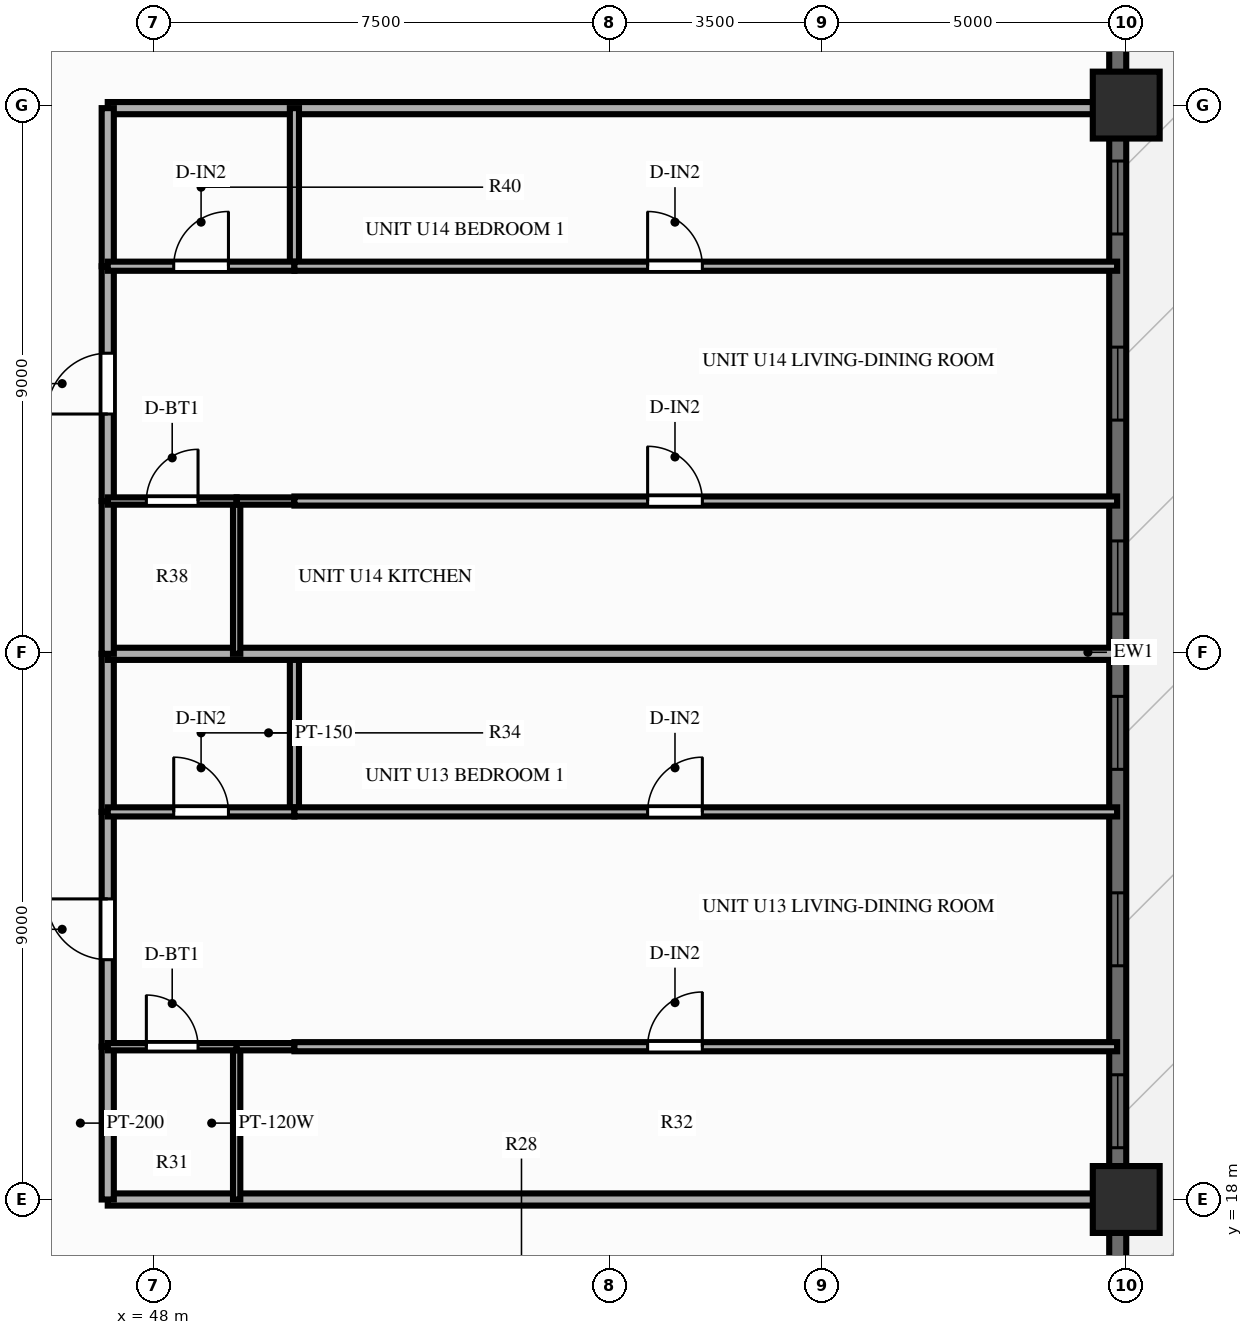
"""IFC4 building model, lengths in metres.
Left out: names, types, materials, properties, quantities, classifications, styles, units other than length and angle.
Written with IfcOpenShell. Run it as: python <this file> out.ifc"""

import sys

from ifc_helpers import new_model, si_unit, direction, frame, frame_2d, origin, origin_2d, place, context, subcontext, project, spatial, rectangle, extrude, source, transform, mapped, element, fill, save


model = new_model("IFC4")
c1 = context("Model", 3, precision=1e-05, world=origin(), true_north=direction((0.0, 1.0)))
c2 = subcontext(c1, "Body", "Model", "MODEL_VIEW")
j1 = project(units=[si_unit("LENGTHUNIT", "METRE"), si_unit("PLANEANGLEUNIT", "RADIAN")], contexts=[c1])
p1 = place(None, origin())
s1 = spatial("IfcSite", under=j1, at=p1, CompositionType="ELEMENT")
p2 = place(p1, origin())
s2 = spatial("IfcBuilding", under=s1, at=p2, CompositionType="ELEMENT")
p3 = place(p2, frame((0.0, 0.0, 25.4)))
s3 = spatial("IfcBuildingStorey", under=s2, at=p3, CompositionType="ELEMENT", Elevation=25.4)
m1 = source(origin(), c2, "Body", "SweptSolid", [
    extrude(rectangle(XDim=1.1, YDim=1.1, at=origin_2d()), origin(), (0.0, 0.0, 1.0), 3.0),
])
for number, where, z_axis, x_axis in (
    (1, (64.0, 18.0, 0.0), (0.0, 0.0, 1.0), (1.0, 0.0, 0.0)),
    (2, (64.0, 36.0, 0.0), (0.0, 0.0, 1.0), (1.0, 0.0, 0.0)),
):
    element("IfcColumn", number, at=place(p3, frame(where, z_axis=z_axis, x_axis=x_axis)), inside=s3, PredefinedType="COLUMN", context=c2, shape_type="MappedRepresentation", body=[
        mapped(m1, transform((0.0, 0.0, 0.0), scale=1.0)),
    ])
p4 = place(p3, frame((63.86, 6.5, 0.0), z_axis=(0.0, 0.0, 1.0), x_axis=(0.0, 1.0, 0.0)))
e3 = element("IfcWall", 3, at=p4, inside=s3, PredefinedType="SOLIDWALL", context=c2, shape_type="SweptSolid", body=[
    extrude(rectangle(XDim=41.0, YDim=0.28, at=frame_2d((20.5, 0.0))), origin(), (0.0, 0.0, 1.0), 2.28),
])
p5 = place(p4, frame((5.15, 0.0, 0.25)))
e4 = element("IfcOpeningElement", 4, at=p5, cuts=e3, PredefinedType="OPENING", context=c2, shape_type="SweptSolid", body=[
    extrude(rectangle(XDim=1.2, YDim=1.5, at=frame_2d((0.6, 0.75))), frame((0.0, 0.152, 0.0), z_axis=(0.0, -1.0, 0.0), x_axis=(1.0, 0.0, 0.0)), (0.0, 0.0, 1.0), 0.304),
])
p6 = place(p4, frame((12.352, 0.0, 0.25)))
e5 = element("IfcOpeningElement", 5, at=p6, cuts=e3, PredefinedType="OPENING", context=c2, shape_type="SweptSolid", body=[
    extrude(rectangle(XDim=1.2, YDim=1.5, at=frame_2d((0.6, 0.75))), frame((0.0, 0.152, 0.0), z_axis=(0.0, -1.0, 0.0), x_axis=(1.0, 0.0, 0.0)), (0.0, 0.0, 1.0), 0.304),
])
p7 = place(p4, frame((15.344, 0.0, 0.25)))
e6 = element("IfcOpeningElement", 6, at=p7, cuts=e3, PredefinedType="OPENING", context=c2, shape_type="SweptSolid", body=[
    extrude(rectangle(XDim=1.2, YDim=1.5, at=frame_2d((0.6, 0.75))), frame((0.0, 0.152, 0.0), z_axis=(0.0, -1.0, 0.0), x_axis=(1.0, 0.0, 0.0)), (0.0, 0.0, 1.0), 0.304),
])
p8 = place(p4, frame((18.575, 0.0, 0.25)))
e7 = element("IfcOpeningElement", 7, at=p8, cuts=e3, PredefinedType="OPENING", context=c2, shape_type="SweptSolid", body=[
    extrude(rectangle(XDim=1.2, YDim=1.5, at=frame_2d((0.6, 0.75))), frame((0.0, 0.152, 0.0), z_axis=(0.0, -1.0, 0.0), x_axis=(1.0, 0.0, 0.0)), (0.0, 0.0, 1.0), 0.304),
])
p9 = place(p4, frame((21.132, 0.0, 0.25)))
e8 = element("IfcOpeningElement", 8, at=p9, cuts=e3, PredefinedType="OPENING", context=c2, shape_type="SweptSolid", body=[
    extrude(rectangle(XDim=1.2, YDim=1.5, at=frame_2d((0.6, 0.75))), frame((0.0, 0.152, 0.0), z_axis=(0.0, -1.0, 0.0), x_axis=(1.0, 0.0, 0.0)), (0.0, 0.0, 1.0), 0.304),
])
p10 = place(p4, frame((24.319, 0.0, 0.25)))
e9 = element("IfcOpeningElement", 9, at=p10, cuts=e3, PredefinedType="OPENING", context=c2, shape_type="SweptSolid", body=[
    extrude(rectangle(XDim=1.2, YDim=1.5, at=frame_2d((0.6, 0.75))), frame((0.0, 0.152, 0.0), z_axis=(0.0, -1.0, 0.0), x_axis=(1.0, 0.0, 0.0)), (0.0, 0.0, 1.0), 0.304),
])
p11 = place(p4, frame((27.38, 0.0, 0.25)))
e10 = element("IfcOpeningElement", 10, at=p11, cuts=e3, PredefinedType="OPENING", context=c2, shape_type="SweptSolid", body=[
    extrude(rectangle(XDim=1.2, YDim=1.5, at=frame_2d((0.6, 0.75))), frame((0.0, 0.152, 0.0), z_axis=(0.0, -1.0, 0.0), x_axis=(1.0, 0.0, 0.0)), (0.0, 0.0, 1.0), 0.304),
])
p12 = place(p4, frame((36.05, 0.0, 0.0), z_axis=(0.0, 0.0, 1.0), x_axis=(-1.0, 0.0, 0.0)))
e11 = element("IfcOpeningElement", 11, at=p12, cuts=e3, PredefinedType="OPENING", context=c2, shape_type="SweptSolid", body=[
    extrude(rectangle(XDim=1.6, YDim=2.15, at=frame_2d((0.8, 1.075))), frame((0.0, 0.152, 0.0), z_axis=(0.0, -1.0, 0.0), x_axis=(1.0, 0.0, 0.0)), (0.0, 0.0, 1.0), 0.304),
])
for number, where, z_axis, x_axis in (
    (12, (47.25, 18.0, 0.0), (0.0, 0.0, 1.0), (1.0, 0.0, 0.0)),
    (13, (47.25, 35.95, 0.0), (0.0, 0.0, 1.0), (1.0, 0.0, 0.0)),
):
    element("IfcWall", number, at=place(p3, frame(where, z_axis=z_axis, x_axis=x_axis)), inside=s3, PredefinedType="PARTITIONING", context=c2, shape_type="SweptSolid", body=[
        extrude(rectangle(XDim=16.6, YDim=0.2, at=frame_2d((8.3, 0.0))), origin(), (0.0, 0.0, 1.0), 2.24),
    ])
p13 = place(p3, frame((47.25, 18.0, 0.0), z_axis=(0.0, 0.0, 1.0), x_axis=(0.0, 1.0, 0.0)))
e14 = element("IfcWall", 14, at=p13, inside=s3, PredefinedType="PARTITIONING", context=c2, shape_type="SweptSolid", body=[
    extrude(rectangle(XDim=2.513, YDim=0.2, at=frame_2d((1.256, 0.0))), origin(), (0.0, 0.0, 1.0), 2.79),
])
p14 = place(p3, frame((47.25, 20.513, 0.0), z_axis=(0.0, 0.0, 1.0), x_axis=(0.0, 1.0, 0.0)))
e15 = element("IfcWall", 15, at=p14, inside=s3, PredefinedType="PARTITIONING", context=c2, shape_type="SweptSolid", body=[
    extrude(rectangle(XDim=3.862, YDim=0.2, at=frame_2d((1.931, 0.0))), origin(), (0.0, 0.0, 1.0), 2.79),
])
p15 = place(p14, frame((1.431, 0.0, 0.0)))
e16 = element("IfcOpeningElement", 16, at=p15, cuts=e15, PredefinedType="OPENING", context=c2, shape_type="SweptSolid", body=[
    extrude(rectangle(XDim=1.0, YDim=2.15, at=frame_2d((0.5, 1.075))), frame((0.0, 0.112, 0.0), z_axis=(0.0, -1.0, 0.0), x_axis=(1.0, 0.0, 0.0)), (0.0, 0.0, 1.0), 0.224),
])
p16 = place(p3, frame((47.25, 24.375, 0.0), z_axis=(0.0, 0.0, 1.0), x_axis=(0.0, 1.0, 0.0)))
e17 = element("IfcWall", 17, at=p16, inside=s3, PredefinedType="PARTITIONING", context=c2, shape_type="SweptSolid", body=[
    extrude(rectangle(XDim=2.6, YDim=0.2, at=frame_2d((1.3, 0.0))), origin(), (0.0, 0.0, 1.0), 2.79),
])
p17 = place(p3, frame((49.37, 18.0, 0.0), z_axis=(0.0, 0.0, 1.0), x_axis=(0.0, 1.0, 0.0)))
e18 = element("IfcWall", 18, at=p17, inside=s3, PredefinedType="PARTITIONING", context=c2, shape_type="SweptSolid", body=[
    extrude(rectangle(XDim=2.513, YDim=0.12, at=frame_2d((1.256, 0.0))), origin(), (0.0, 0.0, 1.0), 2.79),
])
p18 = place(p3, frame((50.32, 24.375, 0.0), z_axis=(0.0, 0.0, 1.0), x_axis=(0.0, 1.0, 0.0)))
e19 = element("IfcWall", 19, at=p18, inside=s3, PredefinedType="PARTITIONING", context=c2, shape_type="SweptSolid", body=[
    extrude(rectangle(XDim=2.6, YDim=0.15, at=frame_2d((1.3, 0.0))), origin(), (0.0, 0.0, 1.0), 2.79),
])
p19 = place(p3, frame((47.25, 20.513, 0.0), z_axis=(0.0, 0.0, 1.0), x_axis=(1.0, 0.0, 0.0)))
e20 = element("IfcWall", 20, at=p19, inside=s3, PredefinedType="PARTITIONING", context=c2, shape_type="SweptSolid", body=[
    extrude(rectangle(XDim=2.12, YDim=0.12, at=frame_2d((1.06, 0.0))), origin(), (0.0, 0.0, 1.0), 2.79),
])
p20 = place(p19, frame((0.635, 0.0, 0.0)))
e21 = element("IfcOpeningElement", 21, at=p20, cuts=e20, PredefinedType="OPENING", context=c2, shape_type="SweptSolid", body=[
    extrude(rectangle(XDim=0.85, YDim=2.05, at=frame_2d((0.425, 1.025))), frame((0.0, 0.072, 0.0), z_axis=(0.0, -1.0, 0.0), x_axis=(1.0, 0.0, 0.0)), (0.0, 0.0, 1.0), 0.144),
])
p21 = place(p3, frame((49.37, 20.513, 0.0), z_axis=(0.0, 0.0, 1.0), x_axis=(1.0, 0.0, 0.0)))
e22 = element("IfcWall", 22, at=p21, inside=s3, PredefinedType="PARTITIONING", context=c2, shape_type="SweptSolid", body=[
    extrude(rectangle(XDim=0.95, YDim=0.12, at=frame_2d((0.475, 0.0))), origin(), (0.0, 0.0, 1.0), 2.79),
])
p22 = place(p3, frame((50.32, 20.513, 0.0), z_axis=(0.0, 0.0, 1.0), x_axis=(1.0, 0.0, 0.0)))
e23 = element("IfcWall", 23, at=p22, inside=s3, PredefinedType="PARTITIONING", context=c2, shape_type="SweptSolid", body=[
    extrude(rectangle(XDim=13.53, YDim=0.15, at=frame_2d((6.765, 0.0))), origin(), (0.0, 0.0, 1.0), 2.79),
])
p23 = place(p22, frame((5.809, 0.0, 0.0)))
e24 = element("IfcOpeningElement", 24, at=p23, cuts=e23, PredefinedType="OPENING", context=c2, shape_type="SweptSolid", body=[
    extrude(rectangle(XDim=0.9, YDim=2.1, at=frame_2d((0.45, 1.05))), frame((0.0, 0.087, 0.0), z_axis=(0.0, -1.0, 0.0), x_axis=(1.0, 0.0, 0.0)), (0.0, 0.0, 1.0), 0.174),
])
p24 = place(p3, frame((47.25, 24.375, 0.0), z_axis=(0.0, 0.0, 1.0), x_axis=(1.0, 0.0, 0.0)))
e25 = element("IfcWall", 25, at=p24, inside=s3, PredefinedType="PARTITIONING", context=c2, shape_type="SweptSolid", body=[
    extrude(rectangle(XDim=3.07, YDim=0.15, at=frame_2d((1.535, 0.0))), origin(), (0.0, 0.0, 1.0), 2.79),
])
p25 = place(p24, frame((1.085, 0.0, 0.0)))
e26 = element("IfcOpeningElement", 26, at=p25, cuts=e25, PredefinedType="OPENING", context=c2, shape_type="SweptSolid", body=[
    extrude(rectangle(XDim=0.9, YDim=2.1, at=frame_2d((0.45, 1.05))), frame((0.0, 0.087, 0.0), z_axis=(0.0, -1.0, 0.0), x_axis=(1.0, 0.0, 0.0)), (0.0, 0.0, 1.0), 0.174),
])
p26 = place(p3, frame((50.32, 24.375, 0.0), z_axis=(0.0, 0.0, 1.0), x_axis=(1.0, 0.0, 0.0)))
e27 = element("IfcWall", 27, at=p26, inside=s3, PredefinedType="PARTITIONING", context=c2, shape_type="SweptSolid", body=[
    extrude(rectangle(XDim=13.53, YDim=0.15, at=frame_2d((6.765, 0.0))), origin(), (0.0, 0.0, 1.0), 2.79),
])
p27 = place(p26, frame((5.809, 0.0, 0.0)))
e28 = element("IfcOpeningElement", 28, at=p27, cuts=e27, PredefinedType="OPENING", context=c2, shape_type="SweptSolid", body=[
    extrude(rectangle(XDim=0.9, YDim=2.1, at=frame_2d((0.45, 1.05))), frame((0.0, 0.087, 0.0), z_axis=(0.0, -1.0, 0.0), x_axis=(1.0, 0.0, 0.0)), (0.0, 0.0, 1.0), 0.174),
])
p28 = place(p3, frame((47.25, 26.975, 0.0), z_axis=(0.0, 0.0, 1.0), x_axis=(1.0, 0.0, 0.0)))
e29 = element("IfcWall", 29, at=p28, inside=s3, PredefinedType="PARTITIONING", context=c2, shape_type="SweptSolid", body=[
    extrude(rectangle(XDim=16.6, YDim=0.2, at=frame_2d((8.3, 0.0))), origin(), (0.0, 0.0, 1.0), 2.79),
])
p29 = place(p3, frame((47.25, 26.975, 0.0), z_axis=(0.0, 0.0, 1.0), x_axis=(0.0, 1.0, 0.0)))
e30 = element("IfcWall", 30, at=p29, inside=s3, PredefinedType="PARTITIONING", context=c2, shape_type="SweptSolid", body=[
    extrude(rectangle(XDim=2.513, YDim=0.2, at=frame_2d((1.256, 0.0))), origin(), (0.0, 0.0, 1.0), 2.79),
])
p30 = place(p3, frame((47.25, 29.488, 0.0), z_axis=(0.0, 0.0, 1.0), x_axis=(0.0, 1.0, 0.0)))
e31 = element("IfcWall", 31, at=p30, inside=s3, PredefinedType="PARTITIONING", context=c2, shape_type="SweptSolid", body=[
    extrude(rectangle(XDim=3.862, YDim=0.2, at=frame_2d((1.931, 0.0))), origin(), (0.0, 0.0, 1.0), 2.79),
])
p31 = place(p30, frame((1.431, 0.0, 0.0)))
e32 = element("IfcOpeningElement", 32, at=p31, cuts=e31, PredefinedType="OPENING", context=c2, shape_type="SweptSolid", body=[
    extrude(rectangle(XDim=1.0, YDim=2.15, at=frame_2d((0.5, 1.075))), frame((0.0, 0.112, 0.0), z_axis=(0.0, -1.0, 0.0), x_axis=(1.0, 0.0, 0.0)), (0.0, 0.0, 1.0), 0.224),
])
p32 = place(p3, frame((47.25, 33.35, 0.0), z_axis=(0.0, 0.0, 1.0), x_axis=(0.0, 1.0, 0.0)))
e33 = element("IfcWall", 33, at=p32, inside=s3, PredefinedType="PARTITIONING", context=c2, shape_type="SweptSolid", body=[
    extrude(rectangle(XDim=2.6, YDim=0.2, at=frame_2d((1.3, 0.0))), origin(), (0.0, 0.0, 1.0), 2.79),
])
p33 = place(p3, frame((49.37, 26.975, 0.0), z_axis=(0.0, 0.0, 1.0), x_axis=(0.0, 1.0, 0.0)))
e34 = element("IfcWall", 34, at=p33, inside=s3, PredefinedType="PARTITIONING", context=c2, shape_type="SweptSolid", body=[
    extrude(rectangle(XDim=2.513, YDim=0.12, at=frame_2d((1.256, 0.0))), origin(), (0.0, 0.0, 1.0), 2.79),
])
p34 = place(p3, frame((50.32, 33.35, 0.0), z_axis=(0.0, 0.0, 1.0), x_axis=(0.0, 1.0, 0.0)))
e35 = element("IfcWall", 35, at=p34, inside=s3, PredefinedType="PARTITIONING", context=c2, shape_type="SweptSolid", body=[
    extrude(rectangle(XDim=2.6, YDim=0.15, at=frame_2d((1.3, 0.0))), origin(), (0.0, 0.0, 1.0), 2.79),
])
p35 = place(p3, frame((47.25, 29.488, 0.0), z_axis=(0.0, 0.0, 1.0), x_axis=(1.0, 0.0, 0.0)))
e36 = element("IfcWall", 36, at=p35, inside=s3, PredefinedType="PARTITIONING", context=c2, shape_type="SweptSolid", body=[
    extrude(rectangle(XDim=2.12, YDim=0.12, at=frame_2d((1.06, 0.0))), origin(), (0.0, 0.0, 1.0), 2.79),
])
p36 = place(p35, frame((0.635, 0.0, 0.0)))
e37 = element("IfcOpeningElement", 37, at=p36, cuts=e36, PredefinedType="OPENING", context=c2, shape_type="SweptSolid", body=[
    extrude(rectangle(XDim=0.85, YDim=2.05, at=frame_2d((0.425, 1.025))), frame((0.0, 0.072, 0.0), z_axis=(0.0, -1.0, 0.0), x_axis=(1.0, 0.0, 0.0)), (0.0, 0.0, 1.0), 0.144),
])
p37 = place(p3, frame((49.37, 29.488, 0.0), z_axis=(0.0, 0.0, 1.0), x_axis=(1.0, 0.0, 0.0)))
e38 = element("IfcWall", 38, at=p37, inside=s3, PredefinedType="PARTITIONING", context=c2, shape_type="SweptSolid", body=[
    extrude(rectangle(XDim=0.95, YDim=0.12, at=frame_2d((0.475, 0.0))), origin(), (0.0, 0.0, 1.0), 2.79),
])
p38 = place(p3, frame((50.32, 29.488, 0.0), z_axis=(0.0, 0.0, 1.0), x_axis=(1.0, 0.0, 0.0)))
e39 = element("IfcWall", 39, at=p38, inside=s3, PredefinedType="PARTITIONING", context=c2, shape_type="SweptSolid", body=[
    extrude(rectangle(XDim=13.53, YDim=0.15, at=frame_2d((6.765, 0.0))), origin(), (0.0, 0.0, 1.0), 2.79),
])
p39 = place(p38, frame((5.809, 0.0, 0.0)))
e40 = element("IfcOpeningElement", 40, at=p39, cuts=e39, PredefinedType="OPENING", context=c2, shape_type="SweptSolid", body=[
    extrude(rectangle(XDim=0.9, YDim=2.1, at=frame_2d((0.45, 1.05))), frame((0.0, 0.087, 0.0), z_axis=(0.0, -1.0, 0.0), x_axis=(1.0, 0.0, 0.0)), (0.0, 0.0, 1.0), 0.174),
])
p40 = place(p3, frame((47.25, 33.35, 0.0), z_axis=(0.0, 0.0, 1.0), x_axis=(1.0, 0.0, 0.0)))
e41 = element("IfcWall", 41, at=p40, inside=s3, PredefinedType="PARTITIONING", context=c2, shape_type="SweptSolid", body=[
    extrude(rectangle(XDim=3.07, YDim=0.15, at=frame_2d((1.535, 0.0))), origin(), (0.0, 0.0, 1.0), 2.79),
])
p41 = place(p40, frame((1.085, 0.0, 0.0)))
e42 = element("IfcOpeningElement", 42, at=p41, cuts=e41, PredefinedType="OPENING", context=c2, shape_type="SweptSolid", body=[
    extrude(rectangle(XDim=0.9, YDim=2.1, at=frame_2d((0.45, 1.05))), frame((0.0, 0.087, 0.0), z_axis=(0.0, -1.0, 0.0), x_axis=(1.0, 0.0, 0.0)), (0.0, 0.0, 1.0), 0.174),
])
p42 = place(p3, frame((50.32, 33.35, 0.0), z_axis=(0.0, 0.0, 1.0), x_axis=(1.0, 0.0, 0.0)))
e43 = element("IfcWall", 43, at=p42, inside=s3, PredefinedType="PARTITIONING", context=c2, shape_type="SweptSolid", body=[
    extrude(rectangle(XDim=13.53, YDim=0.15, at=frame_2d((6.765, 0.0))), origin(), (0.0, 0.0, 1.0), 2.79),
])
p43 = place(p42, frame((5.809, 0.0, 0.0)))
e44 = element("IfcOpeningElement", 44, at=p43, cuts=e43, PredefinedType="OPENING", context=c2, shape_type="SweptSolid", body=[
    extrude(rectangle(XDim=0.9, YDim=2.1, at=frame_2d((0.45, 1.05))), frame((0.0, 0.087, 0.0), z_axis=(0.0, -1.0, 0.0), x_axis=(1.0, 0.0, 0.0)), (0.0, 0.0, 1.0), 0.174),
])
m2 = source(origin(), c2, "Body", "SweptSolid", [
    extrude(rectangle(XDim=1.2, YDim=1.5, at=frame_2d((0.6, 0.75))), frame((0.0, 0.03, 0.0), z_axis=(0.0, -1.0, 0.0), x_axis=(1.0, 0.0, 0.0)), (0.0, 0.0, 1.0), 0.06),
])
p44 = place(p6, origin())
e45 = element("IfcWindow", 45, at=p44, inside=s3, PartitioningType="SINGLE_PANEL", PredefinedType="WINDOW", context=c2, shape_type="MappedRepresentation", body=[
    mapped(m2, transform((0.0, 0.0, 0.0), scale=1.0)),
])
fill(e5, e45)
p45 = place(p7, origin())
e46 = element("IfcWindow", 46, at=p45, inside=s3, PartitioningType="SINGLE_PANEL", PredefinedType="WINDOW", context=c2, shape_type="MappedRepresentation", body=[
    mapped(m2, transform((0.0, 0.0, 0.0), scale=1.0)),
])
fill(e6, e46)
p46 = place(p8, origin())
e47 = element("IfcWindow", 47, at=p46, inside=s3, PartitioningType="SINGLE_PANEL", PredefinedType="WINDOW", context=c2, shape_type="MappedRepresentation", body=[
    mapped(m2, transform((0.0, 0.0, 0.0), scale=1.0)),
])
fill(e7, e47)
p47 = place(p9, origin())
e48 = element("IfcWindow", 48, at=p47, inside=s3, PartitioningType="SINGLE_PANEL", PredefinedType="WINDOW", context=c2, shape_type="MappedRepresentation", body=[
    mapped(m2, transform((0.0, 0.0, 0.0), scale=1.0)),
])
fill(e8, e48)
p48 = place(p10, origin())
e49 = element("IfcWindow", 49, at=p48, inside=s3, PartitioningType="SINGLE_PANEL", PredefinedType="WINDOW", context=c2, shape_type="MappedRepresentation", body=[
    mapped(m2, transform((0.0, 0.0, 0.0), scale=1.0)),
])
fill(e9, e49)
p49 = place(p11, origin())
e50 = element("IfcWindow", 50, at=p49, inside=s3, PartitioningType="SINGLE_PANEL", PredefinedType="WINDOW", context=c2, shape_type="MappedRepresentation", body=[
    mapped(m2, transform((0.0, 0.0, 0.0), scale=1.0)),
])
fill(e10, e50)
m3 = source(origin(), c2, "Body", "SweptSolid", [
    extrude(rectangle(XDim=1.0, YDim=2.15, at=frame_2d((0.5, 1.075))), frame((0.0, 0.025, 0.0), z_axis=(0.0, -1.0, 0.0), x_axis=(1.0, 0.0, 0.0)), (0.0, 0.0, 1.0), 0.05),
])
p50 = place(p15, origin())
e51 = element("IfcDoor", 51, at=p50, inside=s3, OperationType="SINGLE_SWING_RIGHT", PredefinedType="DOOR", context=c2, shape_type="MappedRepresentation", body=[
    mapped(m3, transform((0.0, 0.0, 0.0), scale=1.0)),
])
fill(e16, e51)
m4 = source(origin(), c2, "Body", "SweptSolid", [
    extrude(rectangle(XDim=0.85, YDim=2.05, at=frame_2d((0.425, 1.025))), frame((0.0, 0.025, 0.0), z_axis=(0.0, -1.0, 0.0), x_axis=(1.0, 0.0, 0.0)), (0.0, 0.0, 1.0), 0.05),
])
p51 = place(p20, origin())
e52 = element("IfcDoor", 52, at=p51, inside=s3, OperationType="SINGLE_SWING_LEFT", PredefinedType="DOOR", context=c2, shape_type="MappedRepresentation", body=[
    mapped(m4, transform((0.0, 0.0, 0.0), scale=1.0)),
])
fill(e21, e52)
m5 = source(origin(), c2, "Body", "SweptSolid", [
    extrude(rectangle(XDim=0.9, YDim=2.1, at=frame_2d((0.45, 1.05))), frame((0.0, 0.025, 0.0), z_axis=(0.0, -1.0, 0.0), x_axis=(1.0, 0.0, 0.0)), (0.0, 0.0, 1.0), 0.05),
])
p52 = place(p23, origin())
e53 = element("IfcDoor", 53, at=p52, inside=s3, OperationType="SINGLE_SWING_RIGHT", PredefinedType="DOOR", context=c2, shape_type="MappedRepresentation", body=[
    mapped(m5, transform((0.0, 0.0, 0.0), scale=1.0)),
])
fill(e24, e53)
p53 = place(p25, origin())
e54 = element("IfcDoor", 54, at=p53, inside=s3, OperationType="SINGLE_SWING_LEFT", PredefinedType="DOOR", context=c2, shape_type="MappedRepresentation", body=[
    mapped(m5, transform((0.0, 0.0, 0.0), scale=1.0)),
])
fill(e26, e54)
p54 = place(p27, origin())
e55 = element("IfcDoor", 55, at=p54, inside=s3, OperationType="SINGLE_SWING_RIGHT", PredefinedType="DOOR", context=c2, shape_type="MappedRepresentation", body=[
    mapped(m5, transform((0.0, 0.0, 0.0), scale=1.0)),
])
fill(e28, e55)
p55 = place(p31, origin())
e56 = element("IfcDoor", 56, at=p55, inside=s3, OperationType="SINGLE_SWING_LEFT", PredefinedType="DOOR", context=c2, shape_type="MappedRepresentation", body=[
    mapped(m3, transform((0.0, 0.0, 0.0), scale=1.0)),
])
fill(e32, e56)
p56 = place(p36, origin())
e57 = element("IfcDoor", 57, at=p56, inside=s3, OperationType="SINGLE_SWING_RIGHT", PredefinedType="DOOR", context=c2, shape_type="MappedRepresentation", body=[
    mapped(m4, transform((0.0, 0.0, 0.0), scale=1.0)),
])
fill(e37, e57)
p57 = place(p39, origin())
e58 = element("IfcDoor", 58, at=p57, inside=s3, OperationType="SINGLE_SWING_LEFT", PredefinedType="DOOR", context=c2, shape_type="MappedRepresentation", body=[
    mapped(m5, transform((0.0, 0.0, 0.0), scale=1.0)),
])
fill(e40, e58)
p58 = place(p41, origin())
e59 = element("IfcDoor", 59, at=p58, inside=s3, OperationType="SINGLE_SWING_RIGHT", PredefinedType="DOOR", context=c2, shape_type="MappedRepresentation", body=[
    mapped(m5, transform((0.0, 0.0, 0.0), scale=1.0)),
])
fill(e42, e59)
p59 = place(p43, origin())
e60 = element("IfcDoor", 60, at=p59, inside=s3, OperationType="SINGLE_SWING_LEFT", PredefinedType="DOOR", context=c2, shape_type="MappedRepresentation", body=[
    mapped(m5, transform((0.0, 0.0, 0.0), scale=1.0)),
])
fill(e44, e60)
save(model, sys.argv[1])
